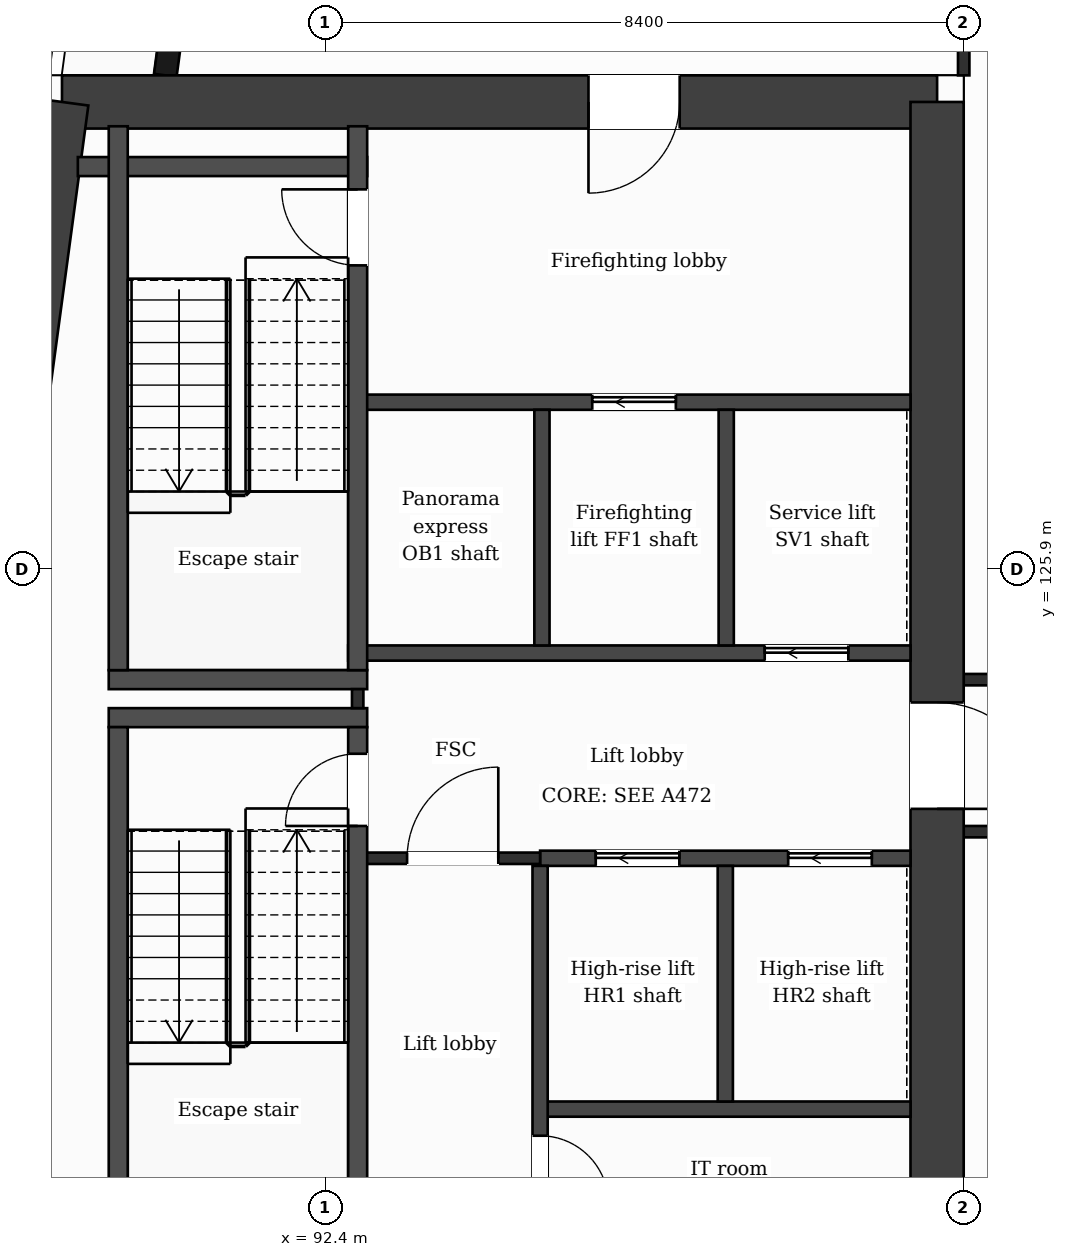
"""IFC4 building model, lengths in metres.
Left out: names, types, materials, properties, quantities, classifications, styles, units other than length and angle.
Written with IfcOpenShell. Run it as: python <this file> out.ifc"""

import sys

from ifc_helpers import new_model, si_unit, direction, frame, frame_2d, origin, place, context, subcontext, project, spatial, rectangle, extrude, element, fill, save


model = new_model("IFC4")
c1 = context("Model", 3, precision=1e-05, world=origin(), true_north=direction((0.0, 1.0)))
c2 = subcontext(c1, "Body", "Model", "MODEL_VIEW")
j1 = project(units=[si_unit("LENGTHUNIT", "METRE"), si_unit("PLANEANGLEUNIT", "RADIAN")], contexts=[c1])
p1 = place(None, origin())
s1 = spatial("IfcSite", under=j1, at=p1, CompositionType="ELEMENT")
p2 = place(p1, origin())
s2 = spatial("IfcBuilding", under=s1, at=p2, CompositionType="ELEMENT")
p3 = place(p2, frame((0.0, 0.0, 292.3)))
s3 = spatial("IfcBuildingStorey", under=s2, at=p3, CompositionType="ELEMENT", Elevation=292.3)
p4 = place(p3, frame((88.937, 132.05, 0.0), z_axis=(0.0, 0.0, 1.0), x_axis=(1.0, 0.0, 0.0)))
e1 = element("IfcWall", 1, at=p4, inside=s3, PredefinedType="SHEAR", context=c2, shape_type="SweptSolid", body=[
    extrude(rectangle(XDim=11.513, YDim=0.7, at=frame_2d((5.757, 0.0))), origin(), (0.0, 0.0, 1.0), 3.7),
])
p5 = place(p4, frame((6.927, 0.0, 0.0)))
e2 = element("IfcOpeningElement", 2, at=p5, cuts=e1, PredefinedType="OPENING", context=c2, shape_type="SweptSolid", body=[
    extrude(rectangle(XDim=1.2, YDim=2.1, at=frame_2d((0.6, 1.05))), frame((0.0, 0.36, 0.0), z_axis=(0.0, -1.0, 0.0), x_axis=(1.0, 0.0, 0.0)), (0.0, 0.0, 1.0), 0.72),
])
p6 = place(p3, frame((100.45, 132.05, 0.0), z_axis=(0.0, 0.0, 1.0), x_axis=(0.0, -1.0, 0.0)))
e3 = element("IfcWall", 3, at=p6, inside=s3, PredefinedType="SHEAR", context=c2, shape_type="SweptSolid", body=[
    extrude(rectangle(XDim=15.7, YDim=0.7, at=frame_2d((7.85, 0.0))), origin(), (0.0, 0.0, 1.0), 3.7),
])
p7 = place(p6, frame((7.9, 0.0, 0.0)))
e4 = element("IfcOpeningElement", 4, at=p7, cuts=e3, PredefinedType="OPENING", context=c2, shape_type="SweptSolid", body=[
    extrude(rectangle(XDim=1.4, YDim=2.1, at=frame_2d((0.7, 1.05))), frame((0.0, 0.36, 0.0), z_axis=(0.0, -1.0, 0.0), x_axis=(1.0, 0.0, 0.0)), (0.0, 0.0, 1.0), 0.72),
])
p8 = place(p3, frame((86.823, 116.35, 0.0), z_axis=(0.0, 0.0, 1.0), x_axis=(0.133416378607, 0.99106007382, 0.0)))
e5 = element("IfcWall", 5, at=p8, inside=s3, PredefinedType="SHEAR", context=c2, shape_type="SweptSolid", body=[
    extrude(rectangle(XDim=15.842, YDim=0.7, at=frame_2d((7.921, 0.0))), origin(), (0.0, 0.0, 1.0), 3.7),
])
p9 = place(p3, frame((91.177, 138.95, 0.0), z_axis=(0.0, 0.0, 1.0), x_axis=(-0.133426664613, -0.991058689065, 0.0)))
e6 = element("IfcWall", 6, at=p9, inside=s3, PredefinedType="SOLIDWALL", context=c2, shape_type="SweptSolid", body=[
    extrude(rectangle(XDim=6.609, YDim=0.3, at=frame_2d((3.305, 0.0))), origin(), (0.0, 0.0, 1.0), 3.38),
])
p10 = place(p9, frame((1.039, 0.0, 0.9)))
e7 = element("IfcOpeningElement", 7, at=p10, cuts=e6, PredefinedType="OPENING", context=c2, shape_type="SweptSolid", body=[
    extrude(rectangle(XDim=1.2, YDim=2.1, at=frame_2d((0.6, 1.05))), frame((0.0, 0.16, 0.0), z_axis=(0.0, -1.0, 0.0), x_axis=(1.0, 0.0, 0.0)), (0.0, 0.0, 1.0), 0.32),
])
p11 = place(p9, frame((4.294, 0.0, 0.0)))
e8 = element("IfcOpeningElement", 8, at=p11, cuts=e6, PredefinedType="OPENING", context=c2, shape_type="SweptSolid", body=[
    extrude(rectangle(XDim=1.2, YDim=2.4, at=frame_2d((0.6, 1.2))), frame((0.0, 0.16, 0.0), z_axis=(0.0, -1.0, 0.0), x_axis=(1.0, 0.0, 0.0)), (0.0, 0.0, 1.0), 0.32),
])
p12 = place(p3, frame((95.227, 118.8, 0.0), z_axis=(0.0, 0.0, 1.0), x_axis=(1.0, 0.0, 0.0)))
e9 = element("IfcWall", 9, at=p12, inside=s3, PredefinedType="PARTITIONING", context=c2, shape_type="SweptSolid", body=[
    extrude(rectangle(XDim=4.873, YDim=0.2, at=frame_2d((2.437, 0.0))), origin(), (0.0, 0.0, 1.0), 3.38),
])
p13 = place(p3, frame((95.227, 122.1, 0.0), z_axis=(0.0, 0.0, 1.0), x_axis=(1.0, 0.0, 0.0)))
e10 = element("IfcWall", 10, at=p13, inside=s3, PredefinedType="PARTITIONING", context=c2, shape_type="SweptSolid", body=[
    extrude(rectangle(XDim=4.873, YDim=0.2, at=frame_2d((2.437, 0.0))), origin(), (0.0, 0.0, 1.0), 3.38),
])
p14 = place(p13, frame((0.732, 0.0, 0.0)))
e11 = element("IfcOpeningElement", 11, at=p14, cuts=e10, PredefinedType="OPENING", context=c2, shape_type="SweptSolid", body=[
    extrude(rectangle(XDim=1.1, YDim=2.1, at=frame_2d((0.55, 1.05))), frame((0.0, 0.11, 0.0), z_axis=(0.0, -1.0, 0.0), x_axis=(1.0, 0.0, 0.0)), (0.0, 0.0, 1.0), 0.22),
])
p15 = place(p13, frame((3.264, 0.0, 0.0)))
e12 = element("IfcOpeningElement", 12, at=p15, cuts=e10, PredefinedType="OPENING", context=c2, shape_type="SweptSolid", body=[
    extrude(rectangle(XDim=1.1, YDim=2.1, at=frame_2d((0.55, 1.05))), frame((0.0, 0.11, 0.0), z_axis=(0.0, -1.0, 0.0), x_axis=(1.0, 0.0, 0.0)), (0.0, 0.0, 1.0), 0.22),
])
p16 = place(p3, frame((92.827, 122.1, 0.0), z_axis=(0.0, 0.0, 1.0), x_axis=(1.0, 0.0, 0.0)))
e13 = element("IfcWall", 13, at=p16, inside=s3, PredefinedType="PARTITIONING", context=c2, shape_type="SweptSolid", body=[
    extrude(rectangle(XDim=2.4, YDim=0.15, at=frame_2d((1.2, 0.0))), origin(), (0.0, 0.0, 1.0), 3.38),
])
p17 = place(p16, frame((0.65, 0.0, 0.0)))
e14 = element("IfcOpeningElement", 14, at=p17, cuts=e13, PredefinedType="OPENING", context=c2, shape_type="SweptSolid", body=[
    extrude(rectangle(XDim=1.2, YDim=2.1, at=frame_2d((0.6, 1.05))), frame((0.0, 0.085, 0.0), z_axis=(0.0, -1.0, 0.0), x_axis=(1.0, 0.0, 0.0)), (0.0, 0.0, 1.0), 0.17),
])
p18 = place(p3, frame((100.8, 122.45, 0.0), z_axis=(0.0, 0.0, 1.0), x_axis=(1.0, 0.0, 0.0)))
e15 = element("IfcWall", 15, at=p18, inside=s3, PredefinedType="PARTITIONING", context=c2, shape_type="SweptSolid", body=[
    extrude(rectangle(XDim=25.2, YDim=0.15, at=frame_2d((12.6, 0.0))), origin(), (0.0, 0.0, 1.0), 3.38),
])
p19 = place(p18, frame((1.6, 0.0, 0.0)))
e16 = element("IfcOpeningElement", 16, at=p19, cuts=e15, PredefinedType="OPENING", context=c2, shape_type="SweptSolid", body=[
    extrude(rectangle(XDim=1.0, YDim=2.1, at=frame_2d((0.5, 1.05))), frame((0.0, 0.085, 0.0), z_axis=(0.0, -1.0, 0.0), x_axis=(1.0, 0.0, 0.0)), (0.0, 0.0, 1.0), 0.17),
])
p20 = place(p18, frame((11.12, 0.0, 0.0)))
e17 = element("IfcOpeningElement", 17, at=p20, cuts=e15, PredefinedType="OPENING", context=c2, shape_type="SweptSolid", body=[
    extrude(rectangle(XDim=0.95, YDim=2.1, at=frame_2d((0.475, 1.05))), frame((0.0, 0.085, 0.0), z_axis=(0.0, -1.0, 0.0), x_axis=(1.0, 0.0, 0.0)), (0.0, 0.0, 1.0), 0.17),
])
p21 = place(p18, frame((13.05, 0.0, 0.0)))
e18 = element("IfcOpeningElement", 18, at=p21, cuts=e15, PredefinedType="OPENING", context=c2, shape_type="SweptSolid", body=[
    extrude(rectangle(XDim=1.0, YDim=2.1, at=frame_2d((0.5, 1.05))), frame((0.0, 0.085, 0.0), z_axis=(0.0, -1.0, 0.0), x_axis=(1.0, 0.0, 0.0)), (0.0, 0.0, 1.0), 0.17),
])
p22 = place(p18, frame((19.61, 0.0, 0.0)))
e19 = element("IfcOpeningElement", 19, at=p22, cuts=e15, PredefinedType="OPENING", context=c2, shape_type="SweptSolid", body=[
    extrude(rectangle(XDim=0.95, YDim=2.1, at=frame_2d((0.475, 1.05))), frame((0.0, 0.085, 0.0), z_axis=(0.0, -1.0, 0.0), x_axis=(1.0, 0.0, 0.0)), (0.0, 0.0, 1.0), 0.17),
])
p23 = place(p18, frame((21.275, 0.0, 0.0)))
e20 = element("IfcOpeningElement", 20, at=p23, cuts=e15, PredefinedType="OPENING", context=c2, shape_type="SweptSolid", body=[
    extrude(rectangle(XDim=0.95, YDim=2.1, at=frame_2d((0.475, 1.05))), frame((0.0, 0.085, 0.0), z_axis=(0.0, -1.0, 0.0), x_axis=(1.0, 0.0, 0.0)), (0.0, 0.0, 1.0), 0.17),
])
for number, where, z_axis, x_axis in (
    (21, (89.552, 123.95, 0.0), (0.0, 0.0, 1.0), (1.0, 0.0, 0.0)),
    (22, (89.552, 124.45, 0.0), (0.0, 0.0, 1.0), (1.0, 0.0, 0.0)),
):
    element("IfcWall", number, at=place(p3, frame(where, z_axis=z_axis, x_axis=x_axis)), inside=s3, PredefinedType="PARTITIONING", context=c2, shape_type="SweptSolid", body=[
        extrude(rectangle(XDim=3.4, YDim=0.25, at=frame_2d((1.7, 0.0))), origin(), (0.0, 0.0, 1.0), 3.38),
    ])
p24 = place(p3, frame((100.8, 124.45, 0.0), z_axis=(0.0, 0.0, 1.0), x_axis=(1.0, 0.0, 0.0)))
e23 = element("IfcWall", 23, at=p24, inside=s3, PredefinedType="PARTITIONING", context=c2, shape_type="SweptSolid", body=[
    extrude(rectangle(XDim=25.2, YDim=0.15, at=frame_2d((12.6, 0.0))), origin(), (0.0, 0.0, 1.0), 3.38),
])
p25 = place(p24, frame((1.85, 0.0, 0.0)))
e24 = element("IfcOpeningElement", 24, at=p25, cuts=e23, PredefinedType="OPENING", context=c2, shape_type="SweptSolid", body=[
    extrude(rectangle(XDim=1.0, YDim=2.1, at=frame_2d((0.5, 1.05))), frame((0.0, 0.085, 0.0), z_axis=(0.0, -1.0, 0.0), x_axis=(1.0, 0.0, 0.0)), (0.0, 0.0, 1.0), 0.17),
])
p26 = place(p24, frame((6.425, 0.0, 0.0)))
e25 = element("IfcOpeningElement", 25, at=p26, cuts=e23, PredefinedType="OPENING", context=c2, shape_type="SweptSolid", body=[
    extrude(rectangle(XDim=1.0, YDim=2.1, at=frame_2d((0.5, 1.05))), frame((0.0, 0.085, 0.0), z_axis=(0.0, -1.0, 0.0), x_axis=(1.0, 0.0, 0.0)), (0.0, 0.0, 1.0), 0.17),
])
p27 = place(p24, frame((9.4, 0.0, 0.0)))
e26 = element("IfcOpeningElement", 26, at=p27, cuts=e23, PredefinedType="OPENING", context=c2, shape_type="SweptSolid", body=[
    extrude(rectangle(XDim=1.0, YDim=2.1, at=frame_2d((0.5, 1.05))), frame((0.0, 0.085, 0.0), z_axis=(0.0, -1.0, 0.0), x_axis=(1.0, 0.0, 0.0)), (0.0, 0.0, 1.0), 0.17),
])
p28 = place(p24, frame((14.825, 0.0, 0.0)))
e27 = element("IfcOpeningElement", 27, at=p28, cuts=e23, PredefinedType="OPENING", context=c2, shape_type="SweptSolid", body=[
    extrude(rectangle(XDim=1.0, YDim=2.1, at=frame_2d((0.5, 1.05))), frame((0.0, 0.085, 0.0), z_axis=(0.0, -1.0, 0.0), x_axis=(1.0, 0.0, 0.0)), (0.0, 0.0, 1.0), 0.17),
])
p29 = place(p24, frame((18.825, 0.0, 0.0)))
e28 = element("IfcOpeningElement", 28, at=p29, cuts=e23, PredefinedType="OPENING", context=c2, shape_type="SweptSolid", body=[
    extrude(rectangle(XDim=1.0, YDim=2.1, at=frame_2d((0.5, 1.05))), frame((0.0, 0.085, 0.0), z_axis=(0.0, -1.0, 0.0), x_axis=(1.0, 0.0, 0.0)), (0.0, 0.0, 1.0), 0.17),
])
p30 = place(p3, frame((92.702, 124.8, 0.0), z_axis=(0.0, 0.0, 1.0), x_axis=(1.0, 0.0, 0.0)))
e29 = element("IfcWall", 29, at=p30, inside=s3, PredefinedType="PARTITIONING", context=c2, shape_type="SweptSolid", body=[
    extrude(rectangle(XDim=7.398, YDim=0.2, at=frame_2d((3.699, 0.0))), origin(), (0.0, 0.0, 1.0), 3.38),
])
p31 = place(p30, frame((5.48, 0.0, 0.0)))
e30 = element("IfcOpeningElement", 30, at=p31, cuts=e29, PredefinedType="OPENING", context=c2, shape_type="SweptSolid", body=[
    extrude(rectangle(XDim=1.1, YDim=2.1, at=frame_2d((0.55, 1.05))), frame((0.0, 0.11, 0.0), z_axis=(0.0, -1.0, 0.0), x_axis=(1.0, 0.0, 0.0)), (0.0, 0.0, 1.0), 0.22),
])
p32 = place(p3, frame((92.827, 128.1, 0.0), z_axis=(0.0, 0.0, 1.0), x_axis=(1.0, 0.0, 0.0)))
e31 = element("IfcWall", 31, at=p32, inside=s3, PredefinedType="PARTITIONING", context=c2, shape_type="SweptSolid", body=[
    extrude(rectangle(XDim=7.273, YDim=0.2, at=frame_2d((3.637, 0.0))), origin(), (0.0, 0.0, 1.0), 3.38),
])
p33 = place(p32, frame((3.086, 0.0, 0.0)))
e32 = element("IfcOpeningElement", 32, at=p33, cuts=e31, PredefinedType="OPENING", context=c2, shape_type="SweptSolid", body=[
    extrude(rectangle(XDim=1.1, YDim=2.1, at=frame_2d((0.55, 1.05))), frame((0.0, 0.11, 0.0), z_axis=(0.0, -1.0, 0.0), x_axis=(1.0, 0.0, 0.0)), (0.0, 0.0, 1.0), 0.22),
])
p34 = place(p3, frame((89.146, 131.2, 0.0), z_axis=(0.0, 0.0, 1.0), x_axis=(1.0, 0.0, 0.0)))
e33 = element("IfcWall", 33, at=p34, inside=s3, PredefinedType="PARTITIONING", context=c2, shape_type="SweptSolid", body=[
    extrude(rectangle(XDim=3.806, YDim=0.25, at=frame_2d((1.903, 0.0))), origin(), (0.0, 0.0, 1.0), 3.38),
])
for number, where, z_axis, x_axis in (
    (34, (89.677, 116.67, 0.0), (0.0, 0.0, 1.0), (0.0, 1.0, 0.0)),
    (35, (89.677, 124.575, 0.0), (0.0, 0.0, 1.0), (0.0, 1.0, 0.0)),
):
    element("IfcWall", number, at=place(p3, frame(where, z_axis=z_axis, x_axis=x_axis)), inside=s3, PredefinedType="PARTITIONING", context=c2, shape_type="SweptSolid", body=[
        extrude(rectangle(XDim=7.155, YDim=0.25, at=frame_2d((3.578, 0.0))), origin(), (0.0, 0.0, 1.0), 3.38),
    ])
p35 = place(p3, frame((92.827, 124.075, 0.0), z_axis=(0.0, 0.0, 1.0), x_axis=(0.0, 1.0, 0.0)))
e36 = element("IfcWall", 36, at=p35, inside=s3, PredefinedType="PARTITIONING", context=c2, shape_type="SweptSolid", body=[
    extrude(rectangle(XDim=0.25, YDim=0.15, at=frame_2d((0.125, 0.0))), origin(), (0.0, 0.0, 1.0), 3.38),
])
p36 = place(p3, frame((92.827, 116.67, 0.0), z_axis=(0.0, 0.0, 1.0), x_axis=(0.0, 1.0, 0.0)))
e37 = element("IfcWall", 37, at=p36, inside=s3, PredefinedType="PARTITIONING", context=c2, shape_type="SweptSolid", body=[
    extrude(rectangle(XDim=7.155, YDim=0.25, at=frame_2d((3.578, 0.0))), origin(), (0.0, 0.0, 1.0), 3.38),
])
p37 = place(p36, frame((5.855, 0.0, 0.0)))
e38 = element("IfcOpeningElement", 38, at=p37, cuts=e37, PredefinedType="OPENING", context=c2, shape_type="SweptSolid", body=[
    extrude(rectangle(XDim=0.95, YDim=2.1, at=frame_2d((0.475, 1.05))), frame((0.0, 0.135, 0.0), z_axis=(0.0, -1.0, 0.0), x_axis=(1.0, 0.0, 0.0)), (0.0, 0.0, 1.0), 0.27),
])
p38 = place(p3, frame((92.827, 124.575, 0.0), z_axis=(0.0, 0.0, 1.0), x_axis=(0.0, 1.0, 0.0)))
e39 = element("IfcWall", 39, at=p38, inside=s3, PredefinedType="PARTITIONING", context=c2, shape_type="SweptSolid", body=[
    extrude(rectangle(XDim=7.155, YDim=0.25, at=frame_2d((3.578, 0.0))), origin(), (0.0, 0.0, 1.0), 3.38),
])
p39 = place(p38, frame((5.325, 0.0, 0.0)))
e40 = element("IfcOpeningElement", 40, at=p39, cuts=e39, PredefinedType="OPENING", context=c2, shape_type="SweptSolid", body=[
    extrude(rectangle(XDim=1.0, YDim=2.1, at=frame_2d((0.5, 1.05))), frame((0.0, 0.135, 0.0), z_axis=(0.0, -1.0, 0.0), x_axis=(1.0, 0.0, 0.0)), (0.0, 0.0, 1.0), 0.27),
])
p40 = place(p3, frame((95.227, 116.67, 0.0), z_axis=(0.0, 0.0, 1.0), x_axis=(0.0, 1.0, 0.0)))
e41 = element("IfcWall", 41, at=p40, inside=s3, PredefinedType="PARTITIONING", context=c2, shape_type="SweptSolid", body=[
    extrude(rectangle(XDim=5.33, YDim=0.2, at=frame_2d((2.665, 0.0))), origin(), (0.0, 0.0, 1.0), 3.38),
])
p41 = place(p40, frame((0.88, 0.0, 0.0)))
e42 = element("IfcOpeningElement", 42, at=p41, cuts=e41, PredefinedType="OPENING", context=c2, shape_type="SweptSolid", body=[
    extrude(rectangle(XDim=0.9, YDim=2.1, at=frame_2d((0.45, 1.05))), frame((0.0, 0.11, 0.0), z_axis=(0.0, -1.0, 0.0), x_axis=(1.0, 0.0, 0.0)), (0.0, 0.0, 1.0), 0.22),
])
for number, where, z_axis, x_axis in (
    (43, (95.251, 124.9, 0.0), (0.0, 0.0, 1.0), (0.0, 1.0, 0.0)),
    (44, (97.664, 118.9, 0.0), (0.0, 0.0, 1.0), (0.0, 1.0, 0.0)),
    (45, (97.676, 124.9, 0.0), (0.0, 0.0, 1.0), (0.0, 1.0, 0.0)),
):
    element("IfcWall", number, at=place(p3, frame(where, z_axis=z_axis, x_axis=x_axis)), inside=s3, PredefinedType="PARTITIONING", context=c2, shape_type="SweptSolid", body=[
        extrude(rectangle(XDim=3.1, YDim=0.2, at=frame_2d((1.55, 0.0))), origin(), (0.0, 0.0, 1.0), 3.38),
    ])
p42 = place(p3, frame((100.8, 132.4, 0.0), z_axis=(0.0, 0.0, 1.0), x_axis=(0.0, 1.0, 0.0)))
e46 = element("IfcWall", 46, at=p42, inside=s3, PredefinedType="PARTITIONING", context=c2, shape_type="SweptSolid", body=[
    extrude(rectangle(XDim=1.325, YDim=0.15, at=frame_2d((0.663, 0.0))), origin(), (0.0, 0.0, 1.0), 3.38),
])
p43 = place(p17, origin())
e47 = element("IfcDoor", 47, at=p43, inside=s3, OperationType="SINGLE_SWING_RIGHT", PredefinedType="DOOR", context=c2, shape_type="SweptSolid", body=[
    extrude(rectangle(XDim=1.2, YDim=2.1, at=frame_2d((0.6, 1.05))), frame((0.0, 0.025, 0.0), z_axis=(0.0, -1.0, 0.0), x_axis=(1.0, 0.0, 0.0)), (0.0, 0.0, 1.0), 0.05),
])
fill(e14, e47)
p44 = place(p14, origin())
e48 = element("IfcDoor", 48, at=p44, inside=s3, OperationType="SLIDING_TO_LEFT", PredefinedType="DOOR", context=c2, shape_type="SweptSolid", body=[
    extrude(rectangle(XDim=1.1, YDim=2.1, at=frame_2d((0.55, 1.05))), frame((0.0, 0.025, 0.0), z_axis=(0.0, -1.0, 0.0), x_axis=(1.0, 0.0, 0.0)), (0.0, 0.0, 1.0), 0.05),
])
fill(e11, e48)
p45 = place(p15, origin())
e49 = element("IfcDoor", 49, at=p45, inside=s3, OperationType="SLIDING_TO_LEFT", PredefinedType="DOOR", context=c2, shape_type="SweptSolid", body=[
    extrude(rectangle(XDim=1.1, YDim=2.1, at=frame_2d((0.55, 1.05))), frame((0.0, 0.025, 0.0), z_axis=(0.0, -1.0, 0.0), x_axis=(1.0, 0.0, 0.0)), (0.0, 0.0, 1.0), 0.05),
])
fill(e12, e49)
p46 = place(p33, origin())
e50 = element("IfcDoor", 50, at=p46, inside=s3, OperationType="SLIDING_TO_LEFT", PredefinedType="DOOR", context=c2, shape_type="SweptSolid", body=[
    extrude(rectangle(XDim=1.1, YDim=2.1, at=frame_2d((0.55, 1.05))), frame((0.0, 0.025, 0.0), z_axis=(0.0, -1.0, 0.0), x_axis=(1.0, 0.0, 0.0)), (0.0, 0.0, 1.0), 0.05),
])
fill(e32, e50)
p47 = place(p31, origin())
e51 = element("IfcDoor", 51, at=p47, inside=s3, OperationType="SLIDING_TO_LEFT", PredefinedType="DOOR", context=c2, shape_type="SweptSolid", body=[
    extrude(rectangle(XDim=1.1, YDim=2.1, at=frame_2d((0.55, 1.05))), frame((0.0, 0.025, 0.0), z_axis=(0.0, -1.0, 0.0), x_axis=(1.0, 0.0, 0.0)), (0.0, 0.0, 1.0), 0.05),
])
fill(e30, e51)
p48 = place(p37, origin())
e52 = element("IfcDoor", 52, at=p48, inside=s3, OperationType="SINGLE_SWING_LEFT", PredefinedType="DOOR", context=c2, shape_type="SweptSolid", body=[
    extrude(rectangle(XDim=0.95, YDim=2.1, at=frame_2d((0.475, 1.05))), frame((0.0, 0.025, 0.0), z_axis=(0.0, -1.0, 0.0), x_axis=(1.0, 0.0, 0.0)), (0.0, 0.0, 1.0), 0.05),
])
fill(e38, e52)
p49 = place(p39, origin())
e53 = element("IfcDoor", 53, at=p49, inside=s3, OperationType="SINGLE_SWING_RIGHT", PredefinedType="DOOR", context=c2, shape_type="SweptSolid", body=[
    extrude(rectangle(XDim=1.0, YDim=2.1, at=frame_2d((0.5, 1.05))), frame((0.0, 0.025, 0.0), z_axis=(0.0, -1.0, 0.0), x_axis=(1.0, 0.0, 0.0)), (0.0, 0.0, 1.0), 0.05),
])
fill(e40, e53)
p50 = place(p41, origin())
e54 = element("IfcDoor", 54, at=p50, inside=s3, OperationType="SINGLE_SWING_LEFT", PredefinedType="DOOR", context=c2, shape_type="SweptSolid", body=[
    extrude(rectangle(XDim=0.9, YDim=2.1, at=frame_2d((0.45, 1.05))), frame((0.0, 0.025, 0.0), z_axis=(0.0, -1.0, 0.0), x_axis=(1.0, 0.0, 0.0)), (0.0, 0.0, 1.0), 0.05),
])
fill(e42, e54)
p51 = place(p5, origin())
e55 = element("IfcDoor", 55, at=p51, inside=s3, OperationType="SINGLE_SWING_LEFT", PredefinedType="DOOR", context=c2, shape_type="SweptSolid", body=[
    extrude(rectangle(XDim=1.2, YDim=2.1, at=frame_2d((0.6, 1.05))), frame((0.0, 0.025, 0.0), z_axis=(0.0, -1.0, 0.0), x_axis=(1.0, 0.0, 0.0)), (0.0, 0.0, 1.0), 0.05),
])
fill(e2, e55)
p52 = place(p7, origin())
e56 = element("IfcDoor", 56, at=p52, inside=s3, OperationType="SINGLE_SWING_RIGHT", PredefinedType="DOOR", context=c2, shape_type="SweptSolid", body=[
    extrude(rectangle(XDim=1.4, YDim=2.1, at=frame_2d((0.7, 1.05))), frame((0.0, 0.025, 0.0), z_axis=(0.0, -1.0, 0.0), x_axis=(1.0, 0.0, 0.0)), (0.0, 0.0, 1.0), 0.05),
])
fill(e4, e56)
save(model, sys.argv[1])
